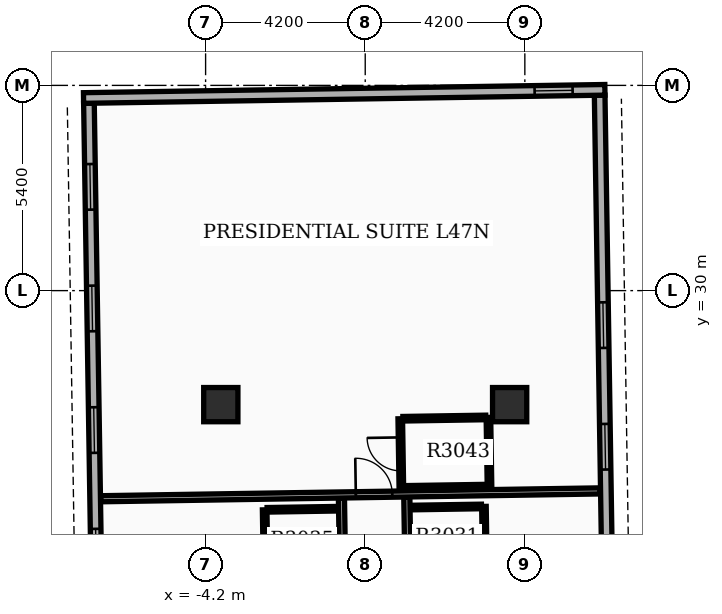
"""IFC4 building model, lengths in metres.
Left out: names, types, materials, properties, quantities, classifications, styles, units other than length and angle.
Written with IfcOpenShell. Run it as: python <this file> out.ifc"""

import sys

from ifc_helpers import new_model, si_unit, direction, frame, frame_2d, origin, origin_2d, place, context, subcontext, project, spatial, rectangle, extrude, element, fill, save


model = new_model("IFC4")
c1 = context("Model", 3, precision=1e-05, world=origin(), true_north=direction((0.0, 1.0)))
c2 = subcontext(c1, "Body", "Model", "MODEL_VIEW")
j1 = project(units=[si_unit("LENGTHUNIT", "METRE"), si_unit("PLANEANGLEUNIT", "RADIAN")], contexts=[c1])
p1 = place(None, origin())
s1 = spatial("IfcSite", under=j1, at=p1, CompositionType="ELEMENT")
p2 = place(p1, origin())
s2 = spatial("IfcBuilding", under=s1, at=p2, CompositionType="ELEMENT")
p3 = place(p2, frame((0.0, 0.0, 187.8)))
s3 = spatial("IfcBuildingStorey", under=s2, at=p3, CompositionType="ELEMENT", Elevation=187.8)
for number, where, z_axis, x_axis in (
    (1, (-3.8, 27.0, 0.0), (0.0, 0.0, 1.0), (1.0, 0.0, 0.0)),
    (2, (3.8, 27.0, 0.0), (0.0, 0.0, 1.0), (1.0, 0.0, 0.0)),
):
    element("IfcColumn", number, at=place(p3, frame(where, z_axis=z_axis, x_axis=x_axis)), inside=s3, PredefinedType="COLUMN", context=c2, shape_type="SweptSolid", body=[
        extrude(rectangle(XDim=0.9, YDim=0.9, at=origin_2d()), origin(), (0.0, 0.0, 1.0), 3.9),
    ])
p4 = place(p3, frame((6.485, 15.044, 0.0), z_axis=(0.0, 0.0, 1.0), x_axis=(-0.01571739401, 0.999876474133, 0.0)))
e3 = element("IfcWall", 3, at=p4, inside=s3, PredefinedType="STANDARD", context=c2, shape_type="SweptSolid", body=[
    extrude(rectangle(XDim=20.1, YDim=0.28, at=frame_2d((10.05, 0.0))), origin(), (0.0, 0.0, 1.0), 2.92),
])
p5 = place(p4, frame((1.6, 0.0, 0.8)))
e4 = element("IfcOpeningElement", 4, at=p5, cuts=e3, PredefinedType="OPENING", context=c2, shape_type="SweptSolid", body=[
    extrude(rectangle(XDim=1.2, YDim=1.6, at=frame_2d((0.6, 0.8))), frame((0.0, 0.15, 0.0), z_axis=(0.0, -1.0, 0.0), x_axis=(1.0, 0.0, 0.0)), (0.0, 0.0, 1.0), 0.3),
])
p6 = place(p4, frame((6.55, 0.0, 0.8)))
e5 = element("IfcOpeningElement", 5, at=p6, cuts=e3, PredefinedType="OPENING", context=c2, shape_type="SweptSolid", body=[
    extrude(rectangle(XDim=1.2, YDim=1.6, at=frame_2d((0.6, 0.8))), frame((0.0, 0.15, 0.0), z_axis=(0.0, -1.0, 0.0), x_axis=(1.0, 0.0, 0.0)), (0.0, 0.0, 1.0), 0.3),
])
p7 = place(p4, frame((10.25, 0.0, 0.8)))
e6 = element("IfcOpeningElement", 6, at=p7, cuts=e3, PredefinedType="OPENING", context=c2, shape_type="SweptSolid", body=[
    extrude(rectangle(XDim=1.2, YDim=1.6, at=frame_2d((0.6, 0.8))), frame((0.0, 0.15, 0.0), z_axis=(0.0, -1.0, 0.0), x_axis=(1.0, 0.0, 0.0)), (0.0, 0.0, 1.0), 0.3),
])
p8 = place(p4, frame((13.45, 0.0, 0.8)))
e7 = element("IfcOpeningElement", 7, at=p8, cuts=e3, PredefinedType="OPENING", context=c2, shape_type="SweptSolid", body=[
    extrude(rectangle(XDim=1.2, YDim=1.6, at=frame_2d((0.6, 0.8))), frame((0.0, 0.15, 0.0), z_axis=(0.0, -1.0, 0.0), x_axis=(1.0, 0.0, 0.0)), (0.0, 0.0, 1.0), 0.3),
])
p9 = place(p3, frame((-7.27, 34.93, 0.0), z_axis=(0.0, 0.0, 1.0), x_axis=(0.015705059908, -0.999876667941, 0.0)))
e8 = element("IfcWall", 8, at=p9, inside=s3, PredefinedType="STANDARD", context=c2, shape_type="SweptSolid", body=[
    extrude(rectangle(XDim=20.1, YDim=0.28, at=frame_2d((10.05, 0.0))), origin(), (0.0, 0.0, 1.0), 2.92),
])
p10 = place(p9, frame((1.6, 0.0, 0.8)))
e9 = element("IfcOpeningElement", 9, at=p10, cuts=e8, PredefinedType="OPENING", context=c2, shape_type="SweptSolid", body=[
    extrude(rectangle(XDim=1.2, YDim=1.6, at=frame_2d((0.6, 0.8))), frame((0.0, 0.15, 0.0), z_axis=(0.0, -1.0, 0.0), x_axis=(1.0, 0.0, 0.0)), (0.0, 0.0, 1.0), 0.3),
])
p11 = place(p9, frame((4.8, 0.0, 0.8)))
e10 = element("IfcOpeningElement", 10, at=p11, cuts=e8, PredefinedType="OPENING", context=c2, shape_type="SweptSolid", body=[
    extrude(rectangle(XDim=1.2, YDim=1.6, at=frame_2d((0.6, 0.8))), frame((0.0, 0.15, 0.0), z_axis=(0.0, -1.0, 0.0), x_axis=(1.0, 0.0, 0.0)), (0.0, 0.0, 1.0), 0.3),
])
p12 = place(p9, frame((8.0, 0.0, 0.8)))
e11 = element("IfcOpeningElement", 11, at=p12, cuts=e8, PredefinedType="OPENING", context=c2, shape_type="SweptSolid", body=[
    extrude(rectangle(XDim=1.2, YDim=1.6, at=frame_2d((0.6, 0.8))), frame((0.0, 0.15, 0.0), z_axis=(0.0, -1.0, 0.0), x_axis=(1.0, 0.0, 0.0)), (0.0, 0.0, 1.0), 0.3),
])
p13 = place(p9, frame((11.2, 0.0, 0.8)))
e12 = element("IfcOpeningElement", 12, at=p13, cuts=e8, PredefinedType="OPENING", context=c2, shape_type="SweptSolid", body=[
    extrude(rectangle(XDim=1.2, YDim=1.6, at=frame_2d((0.6, 0.8))), frame((0.0, 0.15, 0.0), z_axis=(0.0, -1.0, 0.0), x_axis=(1.0, 0.0, 0.0)), (0.0, 0.0, 1.0), 0.3),
])
p14 = place(p9, frame((14.799, 0.0, 0.85)))
e13 = element("IfcOpeningElement", 13, at=p14, cuts=e8, PredefinedType="OPENING", context=c2, shape_type="SweptSolid", body=[
    extrude(rectangle(XDim=1.2, YDim=1.6, at=frame_2d((0.6, 0.8))), frame((0.0, 0.15, 0.0), z_axis=(0.0, -1.0, 0.0), x_axis=(1.0, 0.0, 0.0)), (0.0, 0.0, 1.0), 0.3),
])
p15 = place(p3, frame((6.307, 35.283, 0.0), z_axis=(0.0, 0.0, 1.0), x_axis=(-0.999876549481, -0.015712599986, 0.0)))
e14 = element("IfcWall", 14, at=p15, inside=s3, PredefinedType="STANDARD", context=c2, shape_type="SweptSolid", body=[
    extrude(rectangle(XDim=13.72, YDim=0.28, at=frame_2d((6.86, 0.0))), origin(), (0.0, 0.0, 1.0), 2.92),
])
p16 = place(p15, frame((0.85, 0.0, 0.85)))
e15 = element("IfcOpeningElement", 15, at=p16, cuts=e14, PredefinedType="OPENING", context=c2, shape_type="SweptSolid", body=[
    extrude(rectangle(XDim=1.0, YDim=1.5, at=frame_2d((0.5, 0.75))), frame((0.0, 0.15, 0.0), z_axis=(0.0, -1.0, 0.0), x_axis=(1.0, 0.0, 0.0)), (0.0, 0.0, 1.0), 0.3),
])
p17 = place(p3, frame((1.247, 14.871, 0.0), z_axis=(0.0, 0.0, 1.0), x_axis=(-0.015705264399, 0.999876664729, 0.0)))
e16 = element("IfcWall", 16, at=p17, inside=s3, PredefinedType="PARTITIONING", context=c2, shape_type="SweptSolid", body=[
    extrude(rectangle(XDim=9.7, YDim=0.16, at=frame_2d((4.85, 0.0))), origin(), (0.0, 0.0, 1.0), 2.91),
])
p18 = place(p17, frame((2.575, 0.0, 0.0)))
e17 = element("IfcOpeningElement", 17, at=p18, cuts=e16, PredefinedType="OPENING", context=c2, shape_type="SweptSolid", body=[
    extrude(rectangle(XDim=0.96, YDim=2.15, at=frame_2d((0.48, 1.075))), frame((0.0, 0.09, 0.0), z_axis=(0.0, -1.0, 0.0), x_axis=(1.0, 0.0, 0.0)), (0.0, 0.0, 1.0), 0.18),
])
p19 = place(p17, frame((6.467, 0.0, 0.0)))
e18 = element("IfcOpeningElement", 18, at=p19, cuts=e16, PredefinedType="OPENING", context=c2, shape_type="SweptSolid", body=[
    extrude(rectangle(XDim=0.96, YDim=2.15, at=frame_2d((0.48, 1.075))), frame((0.0, 0.09, 0.0), z_axis=(0.0, -1.0, 0.0), x_axis=(1.0, 0.0, 0.0)), (0.0, 0.0, 1.0), 0.18),
])
p20 = place(p3, frame((1.239, 24.292, 0.0), z_axis=(0.0, 0.0, 1.0), x_axis=(0.999876836305, 0.015694337248, 0.0)))
e19 = element("IfcWall", 19, at=p20, inside=s3, PredefinedType="PARTITIONING", context=c2, shape_type="SweptSolid", body=[
    extrude(rectangle(XDim=1.82, YDim=0.12, at=frame_2d((0.91, 0.0))), origin(), (0.0, 0.0, 1.0), 2.91),
])
p21 = place(p3, frame((3.148, 22.722, 0.0), z_axis=(0.0, 0.0, 1.0), x_axis=(-0.015718448585, 0.999876457556, 0.0)))
e20 = element("IfcWall", 20, at=p21, inside=s3, PredefinedType="PARTITIONING", context=c2, shape_type="SweptSolid", body=[
    extrude(rectangle(XDim=1.6, YDim=0.12, at=frame_2d((0.8, 0.0))), origin(), (0.0, 0.0, 1.0), 2.91),
])
p22 = place(p3, frame((-0.473, 14.844, 0.0), z_axis=(0.0, 0.0, 1.0), x_axis=(-0.015705659641, 0.999876658521, 0.0)))
e21 = element("IfcWall", 21, at=p22, inside=s3, PredefinedType="PARTITIONING", context=c2, shape_type="SweptSolid", body=[
    extrude(rectangle(XDim=9.7, YDim=0.16, at=frame_2d((4.85, 0.0))), origin(), (0.0, 0.0, 1.0), 2.91),
])
p23 = place(p22, frame((2.575, 0.0, 0.0)))
e22 = element("IfcOpeningElement", 22, at=p23, cuts=e21, PredefinedType="OPENING", context=c2, shape_type="SweptSolid", body=[
    extrude(rectangle(XDim=0.96, YDim=2.15, at=frame_2d((0.48, 1.075))), frame((0.0, 0.09, 0.0), z_axis=(0.0, -1.0, 0.0), x_axis=(1.0, 0.0, 0.0)), (0.0, 0.0, 1.0), 0.18),
])
p24 = place(p22, frame((6.467, 0.0, 0.0)))
e23 = element("IfcOpeningElement", 23, at=p24, cuts=e21, PredefinedType="OPENING", context=c2, shape_type="SweptSolid", body=[
    extrude(rectangle(XDim=0.96, YDim=2.15, at=frame_2d((0.48, 1.075))), frame((0.0, 0.09, 0.0), z_axis=(0.0, -1.0, 0.0), x_axis=(1.0, 0.0, 0.0)), (0.0, 0.0, 1.0), 0.18),
])
p25 = place(p3, frame((-2.581, 24.232, 0.0), z_axis=(0.0, 0.0, 1.0), x_axis=(0.999876803258, 0.015696442504, 0.0)))
e24 = element("IfcWall", 24, at=p25, inside=s3, PredefinedType="PARTITIONING", context=c2, shape_type="SweptSolid", body=[
    extrude(rectangle(XDim=1.82, YDim=0.12, at=frame_2d((0.91, 0.0))), origin(), (0.0, 0.0, 1.0), 2.91),
])
p26 = place(p3, frame((-2.621, 22.632, 0.0), z_axis=(0.0, 0.0, 1.0), x_axis=(-0.015716050513, 0.999876495251, 0.0)))
e25 = element("IfcWall", 25, at=p26, inside=s3, PredefinedType="PARTITIONING", context=c2, shape_type="SweptSolid", body=[
    extrude(rectangle(XDim=1.6, YDim=0.12, at=frame_2d((0.8, 0.0))), origin(), (0.0, 0.0, 1.0), 2.91),
])
p27 = place(p3, frame((-6.958, 24.524, 0.0), z_axis=(0.0, 0.0, 1.0), x_axis=(0.999876528878, 0.015713911007, 0.0)))
e26 = element("IfcWall", 26, at=p27, inside=s3, PredefinedType="PARTITIONING", context=c2, shape_type="SweptSolid", body=[
    extrude(rectangle(XDim=13.144, YDim=0.16, at=frame_2d((6.572, 0.0))), origin(), (0.0, 0.0, 1.0), 2.91),
])
p28 = place(p27, frame((6.712, 0.0, 0.0)))
e27 = element("IfcOpeningElement", 27, at=p28, cuts=e26, PredefinedType="OPENING", context=c2, shape_type="SweptSolid", body=[
    extrude(rectangle(XDim=0.96, YDim=2.15, at=frame_2d((0.48, 1.075))), frame((0.0, 0.09, 0.0), z_axis=(0.0, -1.0, 0.0), x_axis=(1.0, 0.0, 0.0)), (0.0, 0.0, 1.0), 0.18),
])
p29 = place(p3, frame((0.95, 24.808, 0.0), z_axis=(0.0, 0.0, 1.0), x_axis=(-0.015696442504, 0.999876803258, 0.0)))
e28 = element("IfcWall", 28, at=p29, inside=s3, PredefinedType="PARTITIONING", context=c2, shape_type="SweptSolid", body=[
    extrude(rectangle(XDim=1.82, YDim=0.12, at=frame_2d((0.91, 0.0))), origin(), (0.0, 0.0, 1.0), 2.91),
])
p30 = place(p29, frame((0.45, 0.0, 0.0)))
e29 = element("IfcOpeningElement", 29, at=p30, cuts=e28, PredefinedType="OPENING", context=c2, shape_type="SweptSolid", body=[
    extrude(rectangle(XDim=0.88, YDim=2.1, at=frame_2d((0.44, 1.05))), frame((0.0, 0.07, 0.0), z_axis=(0.0, -1.0, 0.0), x_axis=(1.0, 0.0, 0.0)), (0.0, 0.0, 1.0), 0.14),
])
p31 = place(p3, frame((3.27, 24.844, 0.0), z_axis=(0.0, 0.0, 1.0), x_axis=(-0.015694337248, 0.999876836305, 0.0)))
e30 = element("IfcWall", 30, at=p31, inside=s3, PredefinedType="PARTITIONING", context=c2, shape_type="SweptSolid", body=[
    extrude(rectangle(XDim=1.82, YDim=0.12, at=frame_2d((0.91, 0.0))), origin(), (0.0, 0.0, 1.0), 2.91),
])
for number, where, z_axis, x_axis in (
    (31, (1.021, 24.809, 0.0), (0.0, 0.0, 1.0), (1.0, 0.016, 0.0)),
    (32, (0.992, 26.629, 0.0), (0.0, 0.0, 1.0), (1.0, 0.016, 0.0)),
):
    element("IfcWall", number, at=place(p3, frame(where, z_axis=z_axis, x_axis=x_axis)), inside=s3, PredefinedType="PARTITIONING", context=c2, shape_type="SweptSolid", body=[
        extrude(rectangle(XDim=2.18, YDim=0.12, at=frame_2d((1.09, 0.0))), origin(), (0.0, 0.0, 1.0), 2.91),
    ])
p32 = place(p7, origin())
e33 = element("IfcWindow", 33, at=p32, inside=s3, PartitioningType="SINGLE_PANEL", PredefinedType="WINDOW", context=c2, shape_type="SweptSolid", body=[
    extrude(rectangle(XDim=1.2, YDim=1.6, at=frame_2d((0.6, 0.8))), frame((0.0, 0.03, 0.0), z_axis=(0.0, -1.0, 0.0), x_axis=(1.0, 0.0, 0.0)), (0.0, 0.0, 1.0), 0.06),
])
fill(e6, e33)
p33 = place(p8, origin())
e34 = element("IfcWindow", 34, at=p33, inside=s3, PartitioningType="SINGLE_PANEL", PredefinedType="WINDOW", context=c2, shape_type="SweptSolid", body=[
    extrude(rectangle(XDim=1.2, YDim=1.6, at=frame_2d((0.6, 0.8))), frame((0.0, 0.03, 0.0), z_axis=(0.0, -1.0, 0.0), x_axis=(1.0, 0.0, 0.0)), (0.0, 0.0, 1.0), 0.06),
])
fill(e7, e34)
p34 = place(p10, origin())
e35 = element("IfcWindow", 35, at=p34, inside=s3, PartitioningType="SINGLE_PANEL", PredefinedType="WINDOW", context=c2, shape_type="SweptSolid", body=[
    extrude(rectangle(XDim=1.2, YDim=1.6, at=frame_2d((0.6, 0.8))), frame((0.0, 0.03, 0.0), z_axis=(0.0, -1.0, 0.0), x_axis=(1.0, 0.0, 0.0)), (0.0, 0.0, 1.0), 0.06),
])
fill(e9, e35)
p35 = place(p11, origin())
e36 = element("IfcWindow", 36, at=p35, inside=s3, PartitioningType="SINGLE_PANEL", PredefinedType="WINDOW", context=c2, shape_type="SweptSolid", body=[
    extrude(rectangle(XDim=1.2, YDim=1.6, at=frame_2d((0.6, 0.8))), frame((0.0, 0.03, 0.0), z_axis=(0.0, -1.0, 0.0), x_axis=(1.0, 0.0, 0.0)), (0.0, 0.0, 1.0), 0.06),
])
fill(e10, e36)
p36 = place(p12, origin())
e37 = element("IfcWindow", 37, at=p36, inside=s3, PartitioningType="SINGLE_PANEL", PredefinedType="WINDOW", context=c2, shape_type="SweptSolid", body=[
    extrude(rectangle(XDim=1.2, YDim=1.6, at=frame_2d((0.6, 0.8))), frame((0.0, 0.03, 0.0), z_axis=(0.0, -1.0, 0.0), x_axis=(1.0, 0.0, 0.0)), (0.0, 0.0, 1.0), 0.06),
])
fill(e11, e37)
p37 = place(p13, origin())
e38 = element("IfcWindow", 38, at=p37, inside=s3, PartitioningType="SINGLE_PANEL", PredefinedType="WINDOW", context=c2, shape_type="SweptSolid", body=[
    extrude(rectangle(XDim=1.2, YDim=1.6, at=frame_2d((0.6, 0.8))), frame((0.0, 0.03, 0.0), z_axis=(0.0, -1.0, 0.0), x_axis=(1.0, 0.0, 0.0)), (0.0, 0.0, 1.0), 0.06),
])
fill(e12, e38)
p38 = place(p16, origin())
e39 = element("IfcWindow", 39, at=p38, inside=s3, PartitioningType="SINGLE_PANEL", PredefinedType="WINDOW", context=c2, shape_type="SweptSolid", body=[
    extrude(rectangle(XDim=1.0, YDim=1.5, at=frame_2d((0.5, 0.75))), frame((0.0, 0.03, 0.0), z_axis=(0.0, -1.0, 0.0), x_axis=(1.0, 0.0, 0.0)), (0.0, 0.0, 1.0), 0.06),
])
fill(e15, e39)
p39 = place(p28, origin())
e40 = element("IfcDoor", 40, at=p39, inside=s3, OperationType="SINGLE_SWING_LEFT", PredefinedType="DOOR", context=c2, shape_type="SweptSolid", body=[
    extrude(rectangle(XDim=0.96, YDim=2.15, at=frame_2d((0.48, 1.075))), frame((0.0, 0.025, 0.0), z_axis=(0.0, -1.0, 0.0), x_axis=(1.0, 0.0, 0.0)), (0.0, 0.0, 1.0), 0.05),
])
fill(e27, e40)
p40 = place(p30, origin())
e41 = element("IfcDoor", 41, at=p40, inside=s3, OperationType="SINGLE_SWING_RIGHT", PredefinedType="DOOR", context=c2, shape_type="SweptSolid", body=[
    extrude(rectangle(XDim=0.88, YDim=2.1, at=frame_2d((0.44, 1.05))), frame((0.0, 0.025, 0.0), z_axis=(0.0, -1.0, 0.0), x_axis=(1.0, 0.0, 0.0)), (0.0, 0.0, 1.0), 0.05),
])
fill(e29, e41)
save(model, sys.argv[1])
